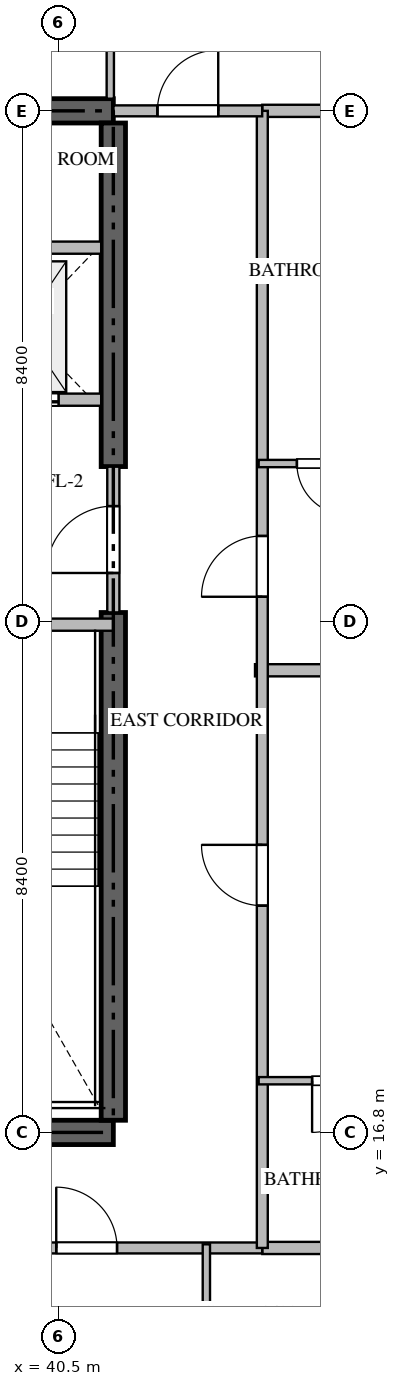
"""IFC4 building model, lengths in metres.
Left out: names, types, materials, properties, quantities, classifications, styles, units other than length and angle.
Written with IfcOpenShell. Run it as: python <this file> out.ifc"""

import sys

from ifc_helpers import new_model, si_unit, direction, frame, frame_2d, origin, place, context, subcontext, project, spatial, rectangle, extrude, source, transform, mapped, element, fill, save


model = new_model("IFC4")
c1 = context("Model", 3, precision=1e-05, world=origin(), true_north=direction((0.0, 1.0)))
c2 = subcontext(c1, "Body", "Model", "MODEL_VIEW")
j1 = project(units=[si_unit("LENGTHUNIT", "METRE"), si_unit("PLANEANGLEUNIT", "RADIAN")], contexts=[c1])
p1 = place(None, origin())
s1 = spatial("IfcSite", under=j1, at=p1, CompositionType="ELEMENT")
p2 = place(p1, origin())
s2 = spatial("IfcBuilding", under=s1, at=p2, CompositionType="ELEMENT")
p3 = place(p2, frame((0.0, 0.0, 180.15)))
s3 = spatial("IfcBuildingStorey", under=s2, at=p3, CompositionType="ELEMENT", Elevation=180.15)
for number, where, z_axis, x_axis in (
    (1, (23.4, 16.8, -0.26), (0.0, 0.0, 1.0), (1.0, 0.0, 0.0)),
    (2, (41.4, 33.6, -0.26), (0.0, 0.0, 1.0), (-1.0, 0.0, 0.0)),
):
    element("IfcWall", number, at=place(p3, frame(where, z_axis=z_axis, x_axis=x_axis)), inside=s3, PredefinedType="SHEAR", context=c2, shape_type="SweptSolid", body=[
        extrude(rectangle(XDim=18.0, YDim=0.4, at=frame_2d((9.0, 0.0))), origin(), (0.0, 0.0, 1.0), 3.748),
    ])
p4 = place(p3, frame((41.4, 17.0, -0.26), z_axis=(0.0, 0.0, 1.0), x_axis=(0.0, 1.0, 0.0)))
e3 = element("IfcWall", 3, at=p4, inside=s3, PredefinedType="SHEAR", context=c2, shape_type="SweptSolid", body=[
    extrude(rectangle(XDim=8.35, YDim=0.4, at=frame_2d((4.175, 0.0))), origin(), (0.0, 0.0, 1.0), 3.748),
])
p5 = place(p3, frame((41.4, 27.75, -0.26), z_axis=(0.0, 0.0, 1.0), x_axis=(0.0, 1.0, 0.0)))
e4 = element("IfcWall", 4, at=p5, inside=s3, PredefinedType="SHEAR", context=c2, shape_type="SweptSolid", body=[
    extrude(rectangle(XDim=5.65, YDim=0.4, at=frame_2d((2.825, 0.0))), origin(), (0.0, 0.0, 1.0), 3.748),
])
p6 = place(p3, frame((36.95, 25.15, 0.0), z_axis=(0.0, 0.0, 1.0), x_axis=(1.0, 0.0, 0.0)))
e5 = element("IfcWall", 5, at=p6, inside=s3, PredefinedType="STANDARD", context=c2, shape_type="SweptSolid", body=[
    extrude(rectangle(XDim=4.45, YDim=0.2, at=frame_2d((2.225, 0.0))), origin(), (0.0, 0.0, 1.0), 3.49),
])
p7 = place(p6, frame((1.65, 0.0, 0.0)))
e6 = element("IfcOpeningElement", 6, at=p7, cuts=e5, PredefinedType="OPENING", context=c2, shape_type="SweptSolid", body=[
    extrude(rectangle(XDim=1.1, YDim=2.15, at=frame_2d((0.55, 1.075))), frame((0.0, 0.11, 0.0), z_axis=(0.0, -1.0, 0.0), x_axis=(1.0, 0.0, 0.0)), (0.0, 0.0, 1.0), 0.22),
])
p8 = place(p3, frame((38.75, 28.85, 0.0), z_axis=(0.0, 0.0, 1.0), x_axis=(1.0, 0.0, 0.0)))
e7 = element("IfcWall", 7, at=p8, inside=s3, PredefinedType="STANDARD", context=c2, shape_type="SweptSolid", body=[
    extrude(rectangle(XDim=2.45, YDim=0.2, at=frame_2d((1.225, 0.0))), origin(), (0.0, 0.0, 1.0), 3.49),
])
p9 = place(p8, frame((0.55, 0.0, 0.0)))
e8 = element("IfcOpeningElement", 8, at=p9, cuts=e7, PredefinedType="OPENING", context=c2, shape_type="SweptSolid", body=[
    extrude(rectangle(XDim=1.2, YDim=2.2, at=frame_2d((0.6, 1.1))), frame((0.0, 0.11, 0.0), z_axis=(0.0, -1.0, 0.0), x_axis=(1.0, 0.0, 0.0)), (0.0, 0.0, 1.0), 0.22),
])
p10 = place(p3, frame((38.75, 31.35, 0.0), z_axis=(0.0, 0.0, 1.0), x_axis=(1.0, 0.0, 0.0)))
e9 = element("IfcWall", 9, at=p10, inside=s3, PredefinedType="STANDARD", context=c2, shape_type="SweptSolid", body=[
    extrude(rectangle(XDim=2.45, YDim=0.2, at=frame_2d((1.225, 0.0))), origin(), (0.0, 0.0, 1.0), 3.49),
])
p11 = place(p3, frame((41.4, 25.352, 0.0), z_axis=(0.0, 0.0, 1.0), x_axis=(0.0, 1.0, 0.0)))
e10 = element("IfcWall", 10, at=p11, inside=s3, PredefinedType="STANDARD", context=c2, shape_type="SweptSolid", body=[
    extrude(rectangle(XDim=2.396, YDim=0.2, at=frame_2d((1.198, 0.0))), origin(), (0.0, 0.0, 1.0), 3.49),
])
p12 = place(p11, frame((0.648, 0.0, 0.0)))
e11 = element("IfcOpeningElement", 11, at=p12, cuts=e10, PredefinedType="OPENING", context=c2, shape_type="SweptSolid", body=[
    extrude(rectangle(XDim=1.1, YDim=2.15, at=frame_2d((0.55, 1.075))), frame((0.0, 0.11, 0.0), z_axis=(0.0, -1.0, 0.0), x_axis=(1.0, 0.0, 0.0)), (0.0, 0.0, 1.0), 0.22),
])
p13 = place(p3, frame((43.73, 24.4, 0.0), z_axis=(0.0, 0.0, 1.0), x_axis=(1.0, 0.0, 0.0)))
e12 = element("IfcWall", 12, at=p13, inside=s3, PredefinedType="PARTITIONING", context=c2, shape_type="SweptSolid", body=[
    extrude(rectangle(XDim=13.188, YDim=0.2, at=frame_2d((6.594, 0.0))), origin(), (0.0, 0.0, 1.0), 3.49),
])
for number, where, z_axis, x_axis in (
    (13, (43.85, 14.9, 0.0), (0.0, 0.0, 1.0), (1.0, 0.0, 0.0)),
    (14, (43.85, 33.6, 0.0), (0.0, 0.0, 1.0), (1.0, 0.0, 0.0)),
):
    element("IfcWall", number, at=place(p3, frame(where, z_axis=z_axis, x_axis=x_axis)), inside=s3, PredefinedType="PARTITIONING", context=c2, shape_type="SweptSolid", body=[
        extrude(rectangle(XDim=13.068, YDim=0.2, at=frame_2d((6.534, 0.0))), origin(), (0.0, 0.0, 1.0), 3.49),
    ])
p14 = place(p3, frame((20.952, 14.9, 0.0), z_axis=(0.0, 0.0, 1.0), x_axis=(1.0, 0.0, 0.0)))
e15 = element("IfcWall", 15, at=p14, inside=s3, PredefinedType="PARTITIONING", context=c2, shape_type="SweptSolid", body=[
    extrude(rectangle(XDim=22.896, YDim=0.18, at=frame_2d((11.448, 0.0))), origin(), (0.0, 0.0, 1.0), 3.49),
])
p15 = place(p14, frame((2.211, 0.0, 0.0)))
e16 = element("IfcOpeningElement", 16, at=p15, cuts=e15, PredefinedType="OPENING", context=c2, shape_type="SweptSolid", body=[
    extrude(rectangle(XDim=1.0, YDim=2.15, at=frame_2d((0.5, 1.075))), frame((0.0, 0.1, 0.0), z_axis=(0.0, -1.0, 0.0), x_axis=(1.0, 0.0, 0.0)), (0.0, 0.0, 1.0), 0.2),
])
p16 = place(p14, frame((6.7, 0.0, 0.0)))
e17 = element("IfcOpeningElement", 17, at=p16, cuts=e15, PredefinedType="OPENING", context=c2, shape_type="SweptSolid", body=[
    extrude(rectangle(XDim=1.0, YDim=2.15, at=frame_2d((0.5, 1.075))), frame((0.0, 0.1, 0.0), z_axis=(0.0, -1.0, 0.0), x_axis=(1.0, 0.0, 0.0)), (0.0, 0.0, 1.0), 0.2),
])
p17 = place(p14, frame((19.509, 0.0, 0.0)))
e18 = element("IfcOpeningElement", 18, at=p17, cuts=e15, PredefinedType="OPENING", context=c2, shape_type="SweptSolid", body=[
    extrude(rectangle(XDim=1.0, YDim=2.15, at=frame_2d((0.5, 1.075))), frame((0.0, 0.1, 0.0), z_axis=(0.0, -1.0, 0.0), x_axis=(1.0, 0.0, 0.0)), (0.0, 0.0, 1.0), 0.2),
])
p18 = place(p3, frame((43.85, 14.9, 0.0), z_axis=(0.0, 0.0, 1.0), x_axis=(0.0, 1.0, 0.0)))
e19 = element("IfcWall", 19, at=p18, inside=s3, PredefinedType="PARTITIONING", context=c2, shape_type="SweptSolid", body=[
    extrude(rectangle(XDim=18.7, YDim=0.18, at=frame_2d((9.35, 0.0))), origin(), (0.0, 0.0, 1.0), 3.49),
])
p19 = place(p18, frame((5.629, 0.0, 0.0)))
e20 = element("IfcOpeningElement", 20, at=p19, cuts=e19, PredefinedType="OPENING", context=c2, shape_type="SweptSolid", body=[
    extrude(rectangle(XDim=1.0, YDim=2.15, at=frame_2d((0.5, 1.075))), frame((0.0, 0.1, 0.0), z_axis=(0.0, -1.0, 0.0), x_axis=(1.0, 0.0, 0.0)), (0.0, 0.0, 1.0), 0.2),
])
p20 = place(p18, frame((10.709, 0.0, 0.0)))
e21 = element("IfcOpeningElement", 21, at=p20, cuts=e19, PredefinedType="OPENING", context=c2, shape_type="SweptSolid", body=[
    extrude(rectangle(XDim=1.0, YDim=2.15, at=frame_2d((0.5, 1.075))), frame((0.0, 0.1, 0.0), z_axis=(0.0, -1.0, 0.0), x_axis=(1.0, 0.0, 0.0)), (0.0, 0.0, 1.0), 0.2),
])
p21 = place(p3, frame((41.402, 33.6, 0.0), z_axis=(0.0, 0.0, 1.0), x_axis=(1.0, 0.0, 0.0)))
e22 = element("IfcWall", 22, at=p21, inside=s3, PredefinedType="PARTITIONING", context=c2, shape_type="SweptSolid", body=[
    extrude(rectangle(XDim=2.446, YDim=0.18, at=frame_2d((1.223, 0.0))), origin(), (0.0, 0.0, 1.0), 3.49),
])
p22 = place(p21, frame((0.723, 0.0, 0.0)))
e23 = element("IfcOpeningElement", 23, at=p22, cuts=e22, PredefinedType="OPENING", context=c2, shape_type="SweptSolid", body=[
    extrude(rectangle(XDim=1.0, YDim=2.15, at=frame_2d((0.5, 1.075))), frame((0.0, 0.1, 0.0), z_axis=(0.0, -1.0, 0.0), x_axis=(1.0, 0.0, 0.0)), (0.0, 0.0, 1.0), 0.2),
])
p23 = place(p3, frame((42.93, 12.15, 0.0), z_axis=(0.0, 0.0, 1.0), x_axis=(0.0, 1.0, 0.0)))
e24 = element("IfcWall", 24, at=p23, inside=s3, PredefinedType="PARTITIONING", context=c2, shape_type="SweptSolid", body=[
    extrude(rectangle(XDim=2.81, YDim=0.12, at=frame_2d((1.405, 0.0))), origin(), (0.0, 0.0, 1.0), 3.49),
])
p24 = place(p3, frame((41.35, 36.35, 0.0), z_axis=(0.0, 0.0, 1.0), x_axis=(0.0, -1.0, 0.0)))
e25 = element("IfcWall", 25, at=p24, inside=s3, PredefinedType="PARTITIONING", context=c2, shape_type="SweptSolid", body=[
    extrude(rectangle(XDim=2.55, YDim=0.12, at=frame_2d((1.275, 0.0))), origin(), (0.0, 0.0, 1.0), 3.49),
])
p25 = place(p3, frame((46.398, 17.65, 0.0), z_axis=(0.0, 0.0, 1.0), x_axis=(-1.0, 0.0, 0.0)))
e26 = element("IfcWall", 26, at=p25, inside=s3, PredefinedType="PARTITIONING", context=c2, shape_type="SweptSolid", body=[
    extrude(rectangle(XDim=2.608, YDim=0.12, at=frame_2d((1.304, 0.0))), origin(), (0.0, 0.0, 1.0), 3.49),
])
p26 = place(p25, frame((0.879, 0.0, 0.0)))
e27 = element("IfcOpeningElement", 27, at=p26, cuts=e26, PredefinedType="OPENING", context=c2, shape_type="SweptSolid", body=[
    extrude(rectangle(XDim=0.85, YDim=2.1, at=frame_2d((0.425, 1.05))), frame((0.0, 0.07, 0.0), z_axis=(0.0, -1.0, 0.0), x_axis=(1.0, 0.0, 0.0)), (0.0, 0.0, 1.0), 0.14),
])
p27 = place(p3, frame((45.898, 27.8, 0.0), z_axis=(0.0, 0.0, 1.0), x_axis=(-1.0, 0.0, 0.0)))
e28 = element("IfcWall", 28, at=p27, inside=s3, PredefinedType="PARTITIONING", context=c2, shape_type="SweptSolid", body=[
    extrude(rectangle(XDim=2.108, YDim=0.12, at=frame_2d((1.054, 0.0))), origin(), (0.0, 0.0, 1.0), 3.49),
])
p28 = place(p27, frame((0.629, 0.0, 0.0)))
e29 = element("IfcOpeningElement", 29, at=p28, cuts=e28, PredefinedType="OPENING", context=c2, shape_type="SweptSolid", body=[
    extrude(rectangle(XDim=0.85, YDim=2.1, at=frame_2d((0.425, 1.05))), frame((0.0, 0.07, 0.0), z_axis=(0.0, -1.0, 0.0), x_axis=(1.0, 0.0, 0.0)), (0.0, 0.0, 1.0), 0.14),
])
m1 = source(origin(), c2, "Body", "SweptSolid", [
    extrude(rectangle(XDim=1.2, YDim=2.2, at=frame_2d((0.6, 1.1))), frame((0.0, 0.025, 0.0), z_axis=(0.0, -1.0, 0.0), x_axis=(1.0, 0.0, 0.0)), (0.0, 0.0, 1.0), 0.05),
])
p29 = place(p9, origin())
e30 = element("IfcDoor", 30, at=p29, inside=s3, OperationType="DOUBLE_DOOR_SLIDING", PredefinedType="DOOR", context=c2, shape_type="MappedRepresentation", body=[
    mapped(m1, transform((0.0, 0.0, 0.0), scale=1.0)),
])
fill(e8, e30)
m2 = source(origin(), c2, "Body", "SweptSolid", [
    extrude(rectangle(XDim=1.1, YDim=2.15, at=frame_2d((0.55, 1.075))), frame((0.0, 0.025, 0.0), z_axis=(0.0, -1.0, 0.0), x_axis=(1.0, 0.0, 0.0)), (0.0, 0.0, 1.0), 0.05),
])
p30 = place(p12, origin())
e31 = element("IfcDoor", 31, at=p30, inside=s3, OperationType="SINGLE_SWING_LEFT", PredefinedType="DOOR", context=c2, shape_type="MappedRepresentation", body=[
    mapped(m2, transform((0.0, 0.0, 0.0), scale=1.0)),
])
fill(e11, e31)
m3 = source(origin(), c2, "Body", "SweptSolid", [
    extrude(rectangle(XDim=1.0, YDim=2.15, at=frame_2d((0.5, 1.075))), frame((0.0, 0.025, 0.0), z_axis=(0.0, -1.0, 0.0), x_axis=(1.0, 0.0, 0.0)), (0.0, 0.0, 1.0), 0.05),
])
p31 = place(p17, origin())
e32 = element("IfcDoor", 32, at=p31, inside=s3, OperationType="SINGLE_SWING_LEFT", PredefinedType="DOOR", context=c2, shape_type="MappedRepresentation", body=[
    mapped(m3, transform((0.0, 0.0, 0.0), scale=1.0)),
])
fill(e18, e32)
p32 = place(p19, origin())
e33 = element("IfcDoor", 33, at=p32, inside=s3, OperationType="SINGLE_SWING_RIGHT", PredefinedType="DOOR", context=c2, shape_type="MappedRepresentation", body=[
    mapped(m3, transform((0.0, 0.0, 0.0), scale=1.0)),
])
fill(e20, e33)
p33 = place(p20, origin())
e34 = element("IfcDoor", 34, at=p33, inside=s3, OperationType="SINGLE_SWING_LEFT", PredefinedType="DOOR", context=c2, shape_type="MappedRepresentation", body=[
    mapped(m3, transform((0.0, 0.0, 0.0), scale=1.0)),
])
fill(e21, e34)
p34 = place(p22, origin())
e35 = element("IfcDoor", 35, at=p34, inside=s3, OperationType="SINGLE_SWING_RIGHT", PredefinedType="DOOR", context=c2, shape_type="MappedRepresentation", body=[
    mapped(m3, transform((0.0, 0.0, 0.0), scale=1.0)),
])
fill(e23, e35)
m4 = source(origin(), c2, "Body", "SweptSolid", [
    extrude(rectangle(XDim=0.85, YDim=2.1, at=frame_2d((0.425, 1.05))), frame((0.0, 0.025, 0.0), z_axis=(0.0, -1.0, 0.0), x_axis=(1.0, 0.0, 0.0)), (0.0, 0.0, 1.0), 0.05),
])
p35 = place(p26, origin())
e36 = element("IfcDoor", 36, at=p35, inside=s3, OperationType="SINGLE_SWING_RIGHT", PredefinedType="DOOR", context=c2, shape_type="MappedRepresentation", body=[
    mapped(m4, transform((0.0, 0.0, 0.0), scale=1.0)),
])
fill(e27, e36)
p36 = place(p28, origin())
e37 = element("IfcDoor", 37, at=p36, inside=s3, OperationType="SINGLE_SWING_LEFT", PredefinedType="DOOR", context=c2, shape_type="MappedRepresentation", body=[
    mapped(m4, transform((0.0, 0.0, 0.0), scale=1.0)),
])
fill(e29, e37)
save(model, sys.argv[1])
